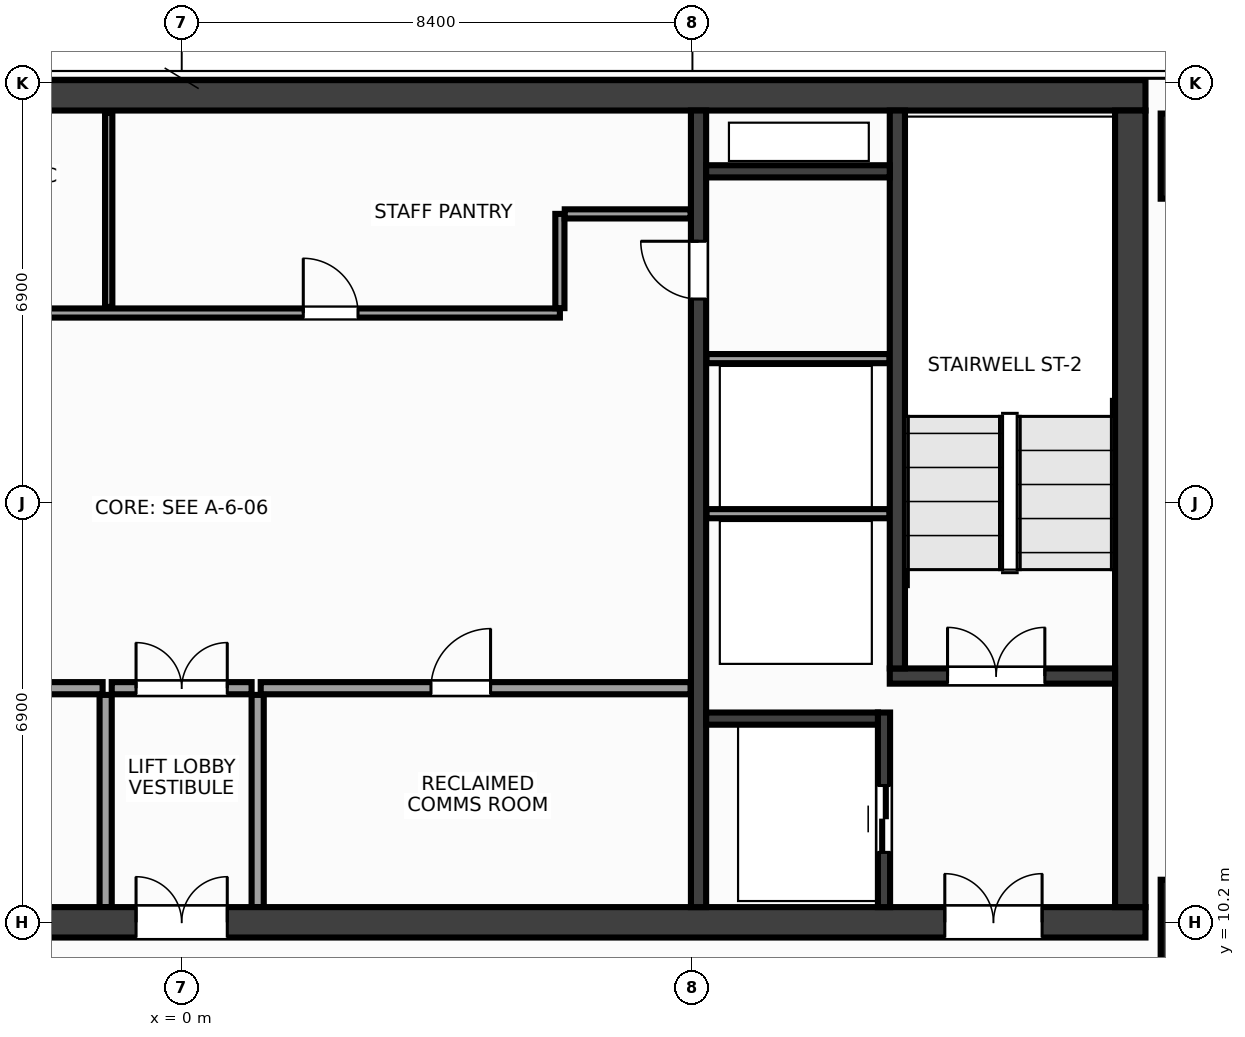
"""IFC4 building model, lengths in metres.
Left out: names, types, materials, properties, quantities, classifications, styles, units other than length and angle.
Written with IfcOpenShell. Run it as: python <this file> out.ifc"""

import sys

from ifc_helpers import new_model, si_unit, direction, frame, frame_2d, origin, origin_2d, place, context, subcontext, project, spatial, rectangle, extrude, source, transform, mapped, element, fill, save


model = new_model("IFC4")
c1 = context("Model", 3, precision=1e-05, world=origin(), true_north=direction((0.0, 1.0)))
c2 = subcontext(c1, "Body", "Model", "MODEL_VIEW")
j1 = project(units=[si_unit("LENGTHUNIT", "METRE"), si_unit("PLANEANGLEUNIT", "RADIAN")], contexts=[c1])
p1 = place(None, origin())
s1 = spatial("IfcSite", under=j1, at=p1, CompositionType="ELEMENT")
p2 = place(p1, origin())
s2 = spatial("IfcBuilding", under=s1, at=p2, CompositionType="ELEMENT")
p3 = place(p2, frame((0.0, 0.0, 268.4)))
s3 = spatial("IfcBuildingStorey", under=s2, at=p3, CompositionType="ELEMENT", Elevation=268.4)
m1 = source(origin(), c2, "Body", "SweptSolid", [
    extrude(rectangle(XDim=31.7, YDim=0.5, at=frame_2d((15.85, 0.0))), origin(), (0.0, 0.0, 1.0), 3.6),
])
p4 = place(p3, frame((-15.85, 23.8, 0.0), z_axis=(0.0, 0.0, 1.0), x_axis=(1.0, 0.0, 0.0)))
e1 = element("IfcWall", 1, at=p4, inside=s3, PredefinedType="SHEAR", context=c2, shape_type="MappedRepresentation", body=[
    mapped(m1, transform((0.0, 0.0, 0.0), x_axis=(1.0, 0.0, 0.0), y_axis=(0.0, 1.0, 0.0), z_axis=(0.0, 0.0, 1.0), scale=1.0)),
])
p5 = place(p3, frame((-15.85, 10.2, 0.0), z_axis=(0.0, 0.0, 1.0), x_axis=(1.0, 0.0, 0.0)))
e2 = element("IfcWall", 2, at=p5, inside=s3, PredefinedType="SHEAR", context=c2, shape_type="MappedRepresentation", body=[
    mapped(m1, transform((0.0, 0.0, 0.0), x_axis=(1.0, 0.0, 0.0), y_axis=(0.0, 1.0, 0.0), z_axis=(0.0, 0.0, 1.0), scale=1.0)),
])
p6 = place(p5, frame((1.7, 0.0, 0.0)))
e3 = element("IfcOpeningElement", 3, at=p6, cuts=e2, PredefinedType="OPENING", context=c2, shape_type="SweptSolid", body=[
    extrude(rectangle(XDim=1.6, YDim=2.15, at=frame_2d((0.8, 1.075))), frame((0.0, 0.262, 0.0), z_axis=(0.0, -1.0, 0.0), x_axis=(1.0, 0.0, 0.0)), (0.0, 0.0, 1.0), 0.524),
])
p7 = place(p5, frame((28.4, 0.0, 0.0)))
e4 = element("IfcOpeningElement", 4, at=p7, cuts=e2, PredefinedType="OPENING", context=c2, shape_type="SweptSolid", body=[
    extrude(rectangle(XDim=1.6, YDim=2.15, at=frame_2d((0.8, 1.075))), frame((0.0, 0.262, 0.0), z_axis=(0.0, -1.0, 0.0), x_axis=(1.0, 0.0, 0.0)), (0.0, 0.0, 1.0), 0.524),
])
p8 = place(p5, frame((15.1, 0.0, 0.0)))
e5 = element("IfcOpeningElement", 5, at=p8, cuts=e2, PredefinedType="OPENING", context=c2, shape_type="SweptSolid", body=[
    extrude(rectangle(XDim=1.5, YDim=2.2, at=frame_2d((0.75, 1.1))), frame((0.0, 0.262, 0.0), z_axis=(0.0, -1.0, 0.0), x_axis=(1.0, 0.0, 0.0)), (0.0, 0.0, 1.0), 0.524),
])
m2 = source(origin(), c2, "Body", "SweptSolid", [
    extrude(rectangle(XDim=13.1, YDim=0.5, at=frame_2d((6.55, 0.0))), origin(), (0.0, 0.0, 1.0), 3.6),
])
p9 = place(p3, frame((15.6, 10.45, 0.0), z_axis=(0.0, 0.0, 1.0), x_axis=(0.0, 1.0, 0.0)))
e6 = element("IfcWall", 6, at=p9, inside=s3, PredefinedType="SHEAR", context=c2, shape_type="MappedRepresentation", body=[
    mapped(m2, transform((0.0, 0.0, 0.0), x_axis=(1.0, 0.0, 0.0), y_axis=(0.0, 1.0, 0.0), z_axis=(0.0, 0.0, 1.0), scale=1.0)),
])
m3 = source(origin(), c2, "Body", "SweptSolid", [
    extrude(rectangle(XDim=13.1, YDim=0.25, at=frame_2d((6.55, 0.0))), origin(), (0.0, 0.0, 1.0), 3.6),
])
p10 = place(p3, frame((8.5, 10.45, 0.0), z_axis=(0.0, 0.0, 1.0), x_axis=(0.0, 1.0, 0.0)))
e7 = element("IfcWall", 7, at=p10, inside=s3, PredefinedType="SHEAR", context=c2, shape_type="MappedRepresentation", body=[
    mapped(m3, transform((0.0, 0.0, 0.0), x_axis=(1.0, 0.0, 0.0), y_axis=(0.0, 1.0, 0.0), z_axis=(0.0, 0.0, 1.0), scale=1.0)),
])
p11 = place(p10, frame((10.0, 0.0, 0.0)))
e8 = element("IfcOpeningElement", 8, at=p11, cuts=e7, PredefinedType="OPENING", context=c2, shape_type="SweptSolid", body=[
    extrude(rectangle(XDim=0.95, YDim=2.15, at=frame_2d((0.475, 1.075))), frame((0.0, 0.137, 0.0), z_axis=(0.0, -1.0, 0.0), x_axis=(1.0, 0.0, 0.0)), (0.0, 0.0, 1.0), 0.274),
])
m4 = source(origin(), c2, "Body", "SweptSolid", [
    extrude(rectangle(XDim=3.705, YDim=0.25, at=frame_2d((1.853, 0.0))), origin(), (0.0, 0.0, 1.0), 3.6),
])
p12 = place(p3, frame((11.645, 14.25, 0.0), z_axis=(0.0, 0.0, 1.0), x_axis=(1.0, 0.0, 0.0)))
e9 = element("IfcWall", 9, at=p12, inside=s3, PredefinedType="SHEAR", context=c2, shape_type="MappedRepresentation", body=[
    mapped(m4, transform((0.0, 0.0, 0.0), x_axis=(1.0, 0.0, 0.0), y_axis=(0.0, 1.0, 0.0), z_axis=(0.0, 0.0, 1.0), scale=1.0)),
])
p13 = place(p12, frame((0.95, 0.0, 0.0)))
e10 = element("IfcOpeningElement", 10, at=p13, cuts=e9, PredefinedType="OPENING", context=c2, shape_type="SweptSolid", body=[
    extrude(rectangle(XDim=1.6, YDim=2.15, at=frame_2d((0.8, 1.075))), frame((0.0, 0.137, 0.0), z_axis=(0.0, -1.0, 0.0), x_axis=(1.0, 0.0, 0.0)), (0.0, 0.0, 1.0), 0.274),
])
m5 = source(origin(), c2, "Body", "SweptSolid", [
    extrude(rectangle(XDim=9.175, YDim=0.25, at=frame_2d((4.587, 0.0))), origin(), (0.0, 0.0, 1.0), 3.6),
])
p14 = place(p3, frame((11.77, 14.375, 0.0), z_axis=(0.0, 0.0, 1.0), x_axis=(0.0, 1.0, 0.0)))
e11 = element("IfcWall", 11, at=p14, inside=s3, PredefinedType="SHEAR", context=c2, shape_type="MappedRepresentation", body=[
    mapped(m5, transform((0.0, 0.0, 0.0), x_axis=(1.0, 0.0, 0.0), y_axis=(0.0, 1.0, 0.0), z_axis=(0.0, 0.0, 1.0), scale=1.0)),
])
m6 = source(origin(), c2, "Body", "SweptSolid", [
    extrude(rectangle(XDim=3.2, YDim=0.2, at=frame_2d((1.6, 0.0))), origin(), (0.0, 0.0, 1.0), 3.6),
])
p15 = place(p3, frame((11.55, 10.45, 0.0), z_axis=(0.0, 0.0, 1.0), x_axis=(0.0, 1.0, 0.0)))
e12 = element("IfcWall", 12, at=p15, inside=s3, PredefinedType="SHEAR", context=c2, shape_type="MappedRepresentation", body=[
    mapped(m6, transform((0.0, 0.0, 0.0), x_axis=(1.0, 0.0, 0.0), y_axis=(0.0, 1.0, 0.0), z_axis=(0.0, 0.0, 1.0), scale=1.0)),
])
p16 = place(p15, frame((0.9, 0.0, 0.0)))
e13 = element("IfcOpeningElement", 13, at=p16, cuts=e12, PredefinedType="OPENING", context=c2, shape_type="SweptSolid", body=[
    extrude(rectangle(XDim=1.1, YDim=2.15, at=frame_2d((0.55, 1.075))), frame((0.0, 0.112, 0.0), z_axis=(0.0, -1.0, 0.0), x_axis=(1.0, 0.0, 0.0)), (0.0, 0.0, 1.0), 0.224),
])
m7 = source(origin(), c2, "Body", "SweptSolid", [
    extrude(rectangle(XDim=2.825, YDim=0.2, at=frame_2d((1.413, 0.0))), origin(), (0.0, 0.0, 1.0), 3.6),
])
p17 = place(p3, frame((8.625, 13.55, 0.0), z_axis=(0.0, 0.0, 1.0), x_axis=(1.0, 0.0, 0.0)))
e14 = element("IfcWall", 14, at=p17, inside=s3, PredefinedType="SHEAR", context=c2, shape_type="MappedRepresentation", body=[
    mapped(m7, transform((0.0, 0.0, 0.0), x_axis=(1.0, 0.0, 0.0), y_axis=(0.0, 1.0, 0.0), z_axis=(0.0, 0.0, 1.0), scale=1.0)),
])
m8 = source(origin(), c2, "Body", "SweptSolid", [
    extrude(rectangle(XDim=3.02, YDim=0.2, at=frame_2d((1.51, 0.0))), origin(), (0.0, 0.0, 1.0), 3.6),
])
p18 = place(p3, frame((8.625, 22.55, 0.0), z_axis=(0.0, 0.0, 1.0), x_axis=(1.0, 0.0, 0.0)))
e15 = element("IfcWall", 15, at=p18, inside=s3, PredefinedType="SHEAR", context=c2, shape_type="MappedRepresentation", body=[
    mapped(m8, transform((0.0, 0.0, 0.0), x_axis=(1.0, 0.0, 0.0), y_axis=(0.0, 1.0, 0.0), z_axis=(0.0, 0.0, 1.0), scale=1.0)),
])
m9 = source(origin(), c2, "Body", "SweptSolid", [
    extrude(rectangle(XDim=1.4, YDim=1.4, at=origin_2d()), origin(), (0.0, 0.0, 1.0), 3.6),
])
for number, where, z_axis, x_axis in (
    (16, (16.8, 10.2, 0.0), (0.0, 0.0, 1.0), (1.0, 0.0, 0.0)),
    (17, (16.8, 22.8, 0.0), (0.0, 0.0, 1.0), (1.0, 0.0, 0.0)),
):
    element("IfcColumn", number, at=place(p3, frame(where, z_axis=z_axis, x_axis=x_axis)), inside=s3, PredefinedType="COLUMN", context=c2, shape_type="MappedRepresentation", body=[
        mapped(m9, transform((0.0, 0.0, 0.0), x_axis=(1.0, 0.0, 0.0), y_axis=(0.0, 1.0, 0.0), z_axis=(0.0, 0.0, 1.0), scale=1.0)),
    ])
m10 = source(origin(), c2, "Body", "SweptSolid", [
    extrude(rectangle(XDim=3.01, YDim=0.15, at=frame_2d((1.505, 0.0))), origin(), (0.0, 0.0, 1.0), 3.37),
])
for number, where, z_axis, x_axis in (
    (18, (8.63, 16.92, 0.0), (0.0, 0.0, 1.0), (1.0, 0.0, 0.0)),
    (19, (8.63, 19.47, 0.0), (0.0, 0.0, 1.0), (1.0, 0.0, 0.0)),
):
    element("IfcWall", number, at=place(p3, frame(where, z_axis=z_axis, x_axis=x_axis)), inside=s3, PredefinedType="PARTITIONING", context=c2, shape_type="MappedRepresentation", body=[
        mapped(m10, transform((0.0, 0.0, 0.0), x_axis=(1.0, 0.0, 0.0), y_axis=(0.0, 1.0, 0.0), z_axis=(0.0, 0.0, 1.0), scale=1.0)),
    ])
m11 = source(origin(), c2, "Body", "SweptSolid", [
    extrude(rectangle(XDim=7.07, YDim=0.2, at=frame_2d((3.535, 0.0))), origin(), (0.0, 0.0, 1.0), 3.37),
])
p19 = place(p3, frame((-8.37, 14.05, 0.0), z_axis=(0.0, 0.0, 1.0), x_axis=(1.0, 0.0, 0.0)))
e20 = element("IfcWall", 20, at=p19, inside=s3, PredefinedType="PARTITIONING", context=c2, shape_type="MappedRepresentation", body=[
    mapped(m11, transform((0.0, 0.0, 0.0), x_axis=(1.0, 0.0, 0.0), y_axis=(0.0, 1.0, 0.0), z_axis=(0.0, 0.0, 1.0), scale=1.0)),
])
p20 = place(p19, frame((2.8, 0.0, 0.0)))
e21 = element("IfcOpeningElement", 21, at=p20, cuts=e20, PredefinedType="OPENING", context=c2, shape_type="SweptSolid", body=[
    extrude(rectangle(XDim=0.98, YDim=2.15, at=frame_2d((0.49, 1.075))), frame((0.0, 0.112, 0.0), z_axis=(0.0, -1.0, 0.0), x_axis=(1.0, 0.0, 0.0)), (0.0, 0.0, 1.0), 0.224),
])
p21 = place(p3, frame((1.3, 14.05, 0.0), z_axis=(0.0, 0.0, 1.0), x_axis=(1.0, 0.0, 0.0)))
e22 = element("IfcWall", 22, at=p21, inside=s3, PredefinedType="PARTITIONING", context=c2, shape_type="MappedRepresentation", body=[
    mapped(m11, transform((0.0, 0.0, 0.0), x_axis=(1.0, 0.0, 0.0), y_axis=(0.0, 1.0, 0.0), z_axis=(0.0, 0.0, 1.0), scale=1.0)),
])
p22 = place(p21, frame((2.8, 0.0, 0.0)))
e23 = element("IfcOpeningElement", 23, at=p22, cuts=e22, PredefinedType="OPENING", context=c2, shape_type="SweptSolid", body=[
    extrude(rectangle(XDim=0.98, YDim=2.15, at=frame_2d((0.49, 1.075))), frame((0.0, 0.112, 0.0), z_axis=(0.0, -1.0, 0.0), x_axis=(1.0, 0.0, 0.0)), (0.0, 0.0, 1.0), 0.224),
])
m12 = source(origin(), c2, "Body", "SweptSolid", [
    extrude(rectangle(XDim=3.49, YDim=0.2, at=frame_2d((1.745, 0.0))), origin(), (0.0, 0.0, 1.0), 3.37),
])
for number, where, z_axis, x_axis in (
    (24, (-1.25, 10.45, 0.0), (0.0, 0.0, 1.0), (0.0, 1.0, 0.0)),
    (25, (1.25, 10.45, 0.0), (0.0, 0.0, 1.0), (0.0, 1.0, 0.0)),
):
    element("IfcWall", number, at=place(p3, frame(where, z_axis=z_axis, x_axis=x_axis)), inside=s3, PredefinedType="PARTITIONING", context=c2, shape_type="MappedRepresentation", body=[
        mapped(m12, transform((0.0, 0.0, 0.0), x_axis=(1.0, 0.0, 0.0), y_axis=(0.0, 1.0, 0.0), z_axis=(0.0, 0.0, 1.0), scale=1.0)),
    ])
m13 = source(origin(), c2, "Body", "SweptSolid", [
    extrude(rectangle(XDim=2.3, YDim=0.2, at=frame_2d((1.15, 0.0))), origin(), (0.0, 0.0, 1.0), 3.37),
])
p23 = place(p3, frame((-1.15, 14.05, 0.0), z_axis=(0.0, 0.0, 1.0), x_axis=(1.0, 0.0, 0.0)))
e26 = element("IfcWall", 26, at=p23, inside=s3, PredefinedType="PARTITIONING", context=c2, shape_type="MappedRepresentation", body=[
    mapped(m13, transform((0.0, 0.0, 0.0), x_axis=(1.0, 0.0, 0.0), y_axis=(0.0, 1.0, 0.0), z_axis=(0.0, 0.0, 1.0), scale=1.0)),
])
p24 = place(p23, frame((0.4, 0.0, 0.0)))
e27 = element("IfcOpeningElement", 27, at=p24, cuts=e26, PredefinedType="OPENING", context=c2, shape_type="SweptSolid", body=[
    extrude(rectangle(XDim=1.5, YDim=2.2, at=frame_2d((0.75, 1.1))), frame((0.0, 0.112, 0.0), z_axis=(0.0, -1.0, 0.0), x_axis=(1.0, 0.0, 0.0)), (0.0, 0.0, 1.0), 0.224),
])
m14 = source(origin(), c2, "Body", "SweptSolid", [
    extrude(rectangle(XDim=14.59, YDim=0.15, at=frame_2d((7.295, 0.0))), origin(), (0.0, 0.0, 1.0), 3.37),
])
p25 = place(p3, frame((-8.37, 20.22, 0.0), z_axis=(0.0, 0.0, 1.0), x_axis=(1.0, 0.0, 0.0)))
e28 = element("IfcWall", 28, at=p25, inside=s3, PredefinedType="PARTITIONING", context=c2, shape_type="MappedRepresentation", body=[
    mapped(m14, transform((0.0, 0.0, 0.0), x_axis=(1.0, 0.0, 0.0), y_axis=(0.0, 1.0, 0.0), z_axis=(0.0, 0.0, 1.0), scale=1.0)),
])
p26 = place(p25, frame((1.36, 0.0, 0.0)))
e29 = element("IfcOpeningElement", 29, at=p26, cuts=e28, PredefinedType="OPENING", context=c2, shape_type="SweptSolid", body=[
    extrude(rectangle(XDim=0.9, YDim=2.15, at=frame_2d((0.45, 1.075))), frame((0.0, 0.087, 0.0), z_axis=(0.0, -1.0, 0.0), x_axis=(1.0, 0.0, 0.0)), (0.0, 0.0, 1.0), 0.174),
])
p27 = place(p25, frame((4.92, 0.0, 0.0)))
e30 = element("IfcOpeningElement", 30, at=p27, cuts=e28, PredefinedType="OPENING", context=c2, shape_type="SweptSolid", body=[
    extrude(rectangle(XDim=0.9, YDim=2.15, at=frame_2d((0.45, 1.075))), frame((0.0, 0.087, 0.0), z_axis=(0.0, -1.0, 0.0), x_axis=(1.0, 0.0, 0.0)), (0.0, 0.0, 1.0), 0.174),
])
p28 = place(p25, frame((10.37, 0.0, 0.0)))
e31 = element("IfcOpeningElement", 31, at=p28, cuts=e28, PredefinedType="OPENING", context=c2, shape_type="SweptSolid", body=[
    extrude(rectangle(XDim=0.9, YDim=2.15, at=frame_2d((0.45, 1.075))), frame((0.0, 0.087, 0.0), z_axis=(0.0, -1.0, 0.0), x_axis=(1.0, 0.0, 0.0)), (0.0, 0.0, 1.0), 0.174),
])
m15 = source(origin(), c2, "Body", "SweptSolid", [
    extrude(rectangle(XDim=1.55, YDim=0.15, at=frame_2d((0.775, 0.0))), origin(), (0.0, 0.0, 1.0), 3.37),
])
p29 = place(p3, frame((6.22, 20.3, 0.0), z_axis=(0.0, 0.0, 1.0), x_axis=(0.0, 1.0, 0.0)))
e32 = element("IfcWall", 32, at=p29, inside=s3, PredefinedType="PARTITIONING", context=c2, shape_type="MappedRepresentation", body=[
    mapped(m15, transform((0.0, 0.0, 0.0), x_axis=(1.0, 0.0, 0.0), y_axis=(0.0, 1.0, 0.0), z_axis=(0.0, 0.0, 1.0), scale=1.0)),
])
m16 = source(origin(), c2, "Body", "SweptSolid", [
    extrude(rectangle(XDim=2.07, YDim=0.15, at=frame_2d((1.035, 0.0))), origin(), (0.0, 0.0, 1.0), 3.37),
])
p30 = place(p3, frame((6.3, 21.85, 0.0), z_axis=(0.0, 0.0, 1.0), x_axis=(1.0, 0.0, 0.0)))
e33 = element("IfcWall", 33, at=p30, inside=s3, PredefinedType="PARTITIONING", context=c2, shape_type="MappedRepresentation", body=[
    mapped(m16, transform((0.0, 0.0, 0.0), x_axis=(1.0, 0.0, 0.0), y_axis=(0.0, 1.0, 0.0), z_axis=(0.0, 0.0, 1.0), scale=1.0)),
])
m17 = source(origin(), c2, "Body", "SweptSolid", [
    extrude(rectangle(XDim=3.19, YDim=0.12, at=frame_2d((1.595, 0.0))), origin(), (0.0, 0.0, 1.0), 3.37),
])
p31 = place(p3, frame((-1.2, 20.32, 0.0), z_axis=(0.0, 0.0, 1.0), x_axis=(0.0, 1.0, 0.0)))
e34 = element("IfcWall", 34, at=p31, inside=s3, PredefinedType="PARTITIONING", context=c2, shape_type="MappedRepresentation", body=[
    mapped(m17, transform((0.0, 0.0, 0.0), x_axis=(1.0, 0.0, 0.0), y_axis=(0.0, 1.0, 0.0), z_axis=(0.0, 0.0, 1.0), scale=1.0)),
])
m18 = source(origin(), c2, "Body", "SweptSolid", [
    extrude(rectangle(XDim=1.6, YDim=2.15, at=frame_2d((0.8, 1.075))), frame((0.0, 0.025, 0.0), z_axis=(0.0, -1.0, 0.0), x_axis=(1.0, 0.0, 0.0)), (0.0, 0.0, 1.0), 0.05),
])
p32 = place(p13, origin())
e35 = element("IfcDoor", 35, at=p32, inside=s3, OperationType="DOUBLE_DOOR_SINGLE_SWING", PredefinedType="DOOR", context=c2, shape_type="MappedRepresentation", body=[
    mapped(m18, transform((0.0, 0.0, 0.0), x_axis=(1.0, 0.0, 0.0), y_axis=(0.0, 1.0, 0.0), z_axis=(0.0, 0.0, 1.0), scale=1.0)),
])
fill(e10, e35)
p33 = place(p7, origin())
e36 = element("IfcDoor", 36, at=p33, inside=s3, OperationType="DOUBLE_DOOR_SINGLE_SWING", PredefinedType="DOOR", context=c2, shape_type="MappedRepresentation", body=[
    mapped(m18, transform((0.0, 0.0, 0.0), x_axis=(1.0, 0.0, 0.0), y_axis=(0.0, 1.0, 0.0), z_axis=(0.0, 0.0, 1.0), scale=1.0)),
])
fill(e4, e36)
m19 = source(origin(), c2, "Body", "SweptSolid", [
    extrude(rectangle(XDim=1.1, YDim=2.15, at=frame_2d((0.55, 1.075))), frame((0.0, 0.025, 0.0), z_axis=(0.0, -1.0, 0.0), x_axis=(1.0, 0.0, 0.0)), (0.0, 0.0, 1.0), 0.05),
])
p34 = place(p16, origin())
e37 = element("IfcDoor", 37, at=p34, inside=s3, OperationType="DOUBLE_DOOR_SLIDING", PredefinedType="DOOR", context=c2, shape_type="MappedRepresentation", body=[
    mapped(m19, transform((0.0, 0.0, 0.0), x_axis=(1.0, 0.0, 0.0), y_axis=(0.0, 1.0, 0.0), z_axis=(0.0, 0.0, 1.0), scale=1.0)),
])
fill(e13, e37)
m20 = source(origin(), c2, "Body", "SweptSolid", [
    extrude(rectangle(XDim=0.95, YDim=2.15, at=frame_2d((0.475, 1.075))), frame((0.0, 0.025, 0.0), z_axis=(0.0, -1.0, 0.0), x_axis=(1.0, 0.0, 0.0)), (0.0, 0.0, 1.0), 0.05),
])
p35 = place(p11, origin())
e38 = element("IfcDoor", 38, at=p35, inside=s3, OperationType="SINGLE_SWING_RIGHT", PredefinedType="DOOR", context=c2, shape_type="MappedRepresentation", body=[
    mapped(m20, transform((0.0, 0.0, 0.0), x_axis=(1.0, 0.0, 0.0), y_axis=(0.0, 1.0, 0.0), z_axis=(0.0, 0.0, 1.0), scale=1.0)),
])
fill(e8, e38)
m21 = source(origin(), c2, "Body", "SweptSolid", [
    extrude(rectangle(XDim=0.98, YDim=2.15, at=frame_2d((0.49, 1.075))), frame((0.0, 0.025, 0.0), z_axis=(0.0, -1.0, 0.0), x_axis=(1.0, 0.0, 0.0)), (0.0, 0.0, 1.0), 0.05),
])
p36 = place(p22, origin())
e39 = element("IfcDoor", 39, at=p36, inside=s3, OperationType="SINGLE_SWING_RIGHT", PredefinedType="DOOR", context=c2, shape_type="MappedRepresentation", body=[
    mapped(m21, transform((0.0, 0.0, 0.0), x_axis=(1.0, 0.0, 0.0), y_axis=(0.0, 1.0, 0.0), z_axis=(0.0, 0.0, 1.0), scale=1.0)),
])
fill(e23, e39)
m22 = source(origin(), c2, "Body", "SweptSolid", [
    extrude(rectangle(XDim=1.5, YDim=2.2, at=frame_2d((0.75, 1.1))), frame((0.0, 0.025, 0.0), z_axis=(0.0, -1.0, 0.0), x_axis=(1.0, 0.0, 0.0)), (0.0, 0.0, 1.0), 0.05),
])
p37 = place(p24, origin())
e40 = element("IfcDoor", 40, at=p37, inside=s3, OperationType="DOUBLE_DOOR_SINGLE_SWING", PredefinedType="DOOR", context=c2, shape_type="MappedRepresentation", body=[
    mapped(m22, transform((0.0, 0.0, 0.0), x_axis=(1.0, 0.0, 0.0), y_axis=(0.0, 1.0, 0.0), z_axis=(0.0, 0.0, 1.0), scale=1.0)),
])
fill(e27, e40)
p38 = place(p8, origin())
e41 = element("IfcDoor", 41, at=p38, inside=s3, OperationType="DOUBLE_DOOR_SINGLE_SWING", PredefinedType="DOOR", context=c2, shape_type="MappedRepresentation", body=[
    mapped(m22, transform((0.0, 0.0, 0.0), x_axis=(1.0, 0.0, 0.0), y_axis=(0.0, 1.0, 0.0), z_axis=(0.0, 0.0, 1.0), scale=1.0)),
])
fill(e5, e41)
m23 = source(origin(), c2, "Body", "SweptSolid", [
    extrude(rectangle(XDim=0.9, YDim=2.15, at=frame_2d((0.45, 1.075))), frame((0.0, 0.025, 0.0), z_axis=(0.0, -1.0, 0.0), x_axis=(1.0, 0.0, 0.0)), (0.0, 0.0, 1.0), 0.05),
])
p39 = place(p28, origin())
e42 = element("IfcDoor", 42, at=p39, inside=s3, OperationType="SINGLE_SWING_LEFT", PredefinedType="DOOR", context=c2, shape_type="MappedRepresentation", body=[
    mapped(m23, transform((0.0, 0.0, 0.0), x_axis=(1.0, 0.0, 0.0), y_axis=(0.0, 1.0, 0.0), z_axis=(0.0, 0.0, 1.0), scale=1.0)),
])
fill(e31, e42)
save(model, sys.argv[1])
